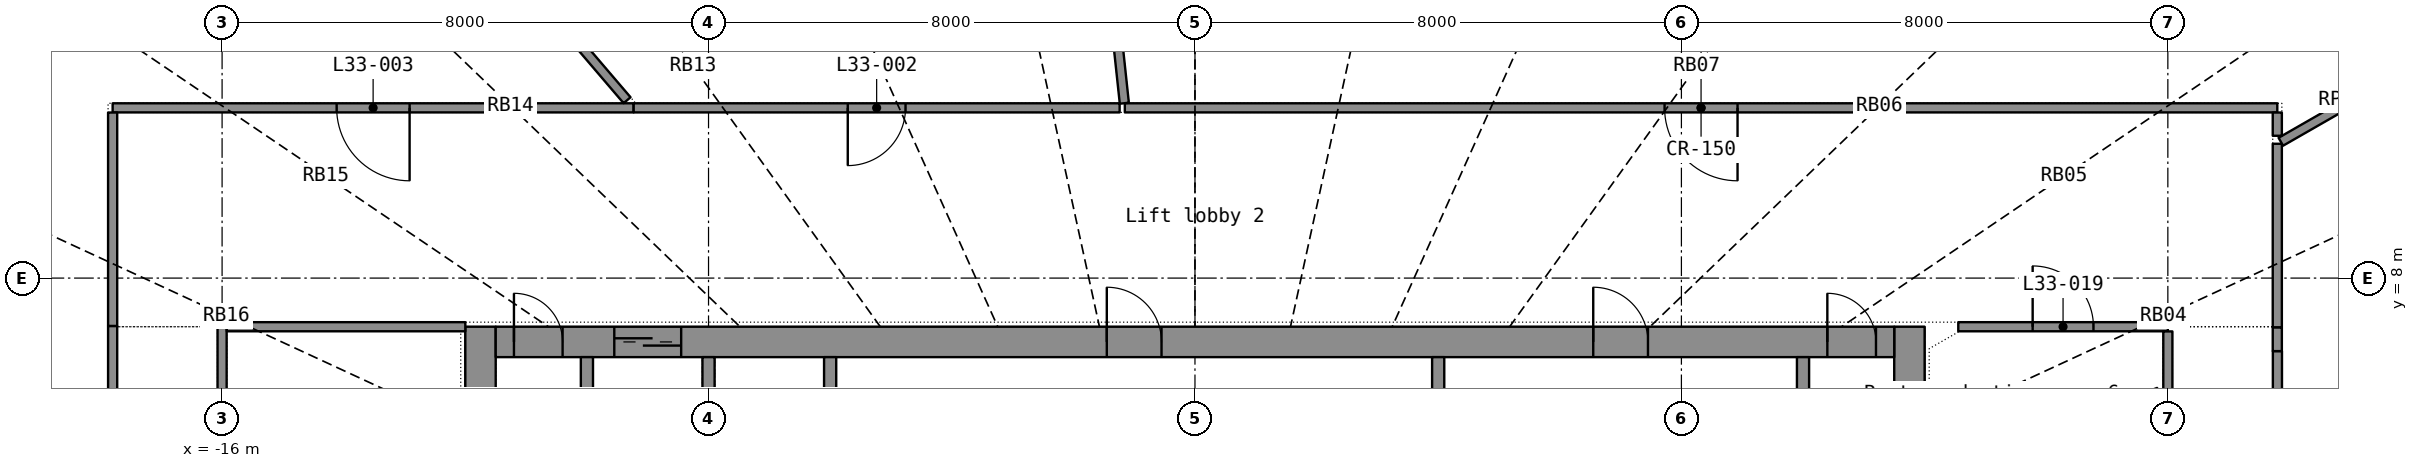
"""IFC4 building model, lengths in metres.
Left out: names, types, materials, properties, quantities, classifications, styles, units other than length and angle.
Written with IfcOpenShell. Run it as: python <this file> out.ifc"""

import sys

from ifc_helpers import new_model, si_unit, direction, frame, frame_2d, origin, place, context, subcontext, project, spatial, rectangle, extrude, element, fill, save


model = new_model("IFC4")
c1 = context("Model", 3, precision=1e-05, world=origin(), true_north=direction((0.0, 1.0)))
c2 = subcontext(c1, "Body", "Model", "MODEL_VIEW")
j1 = project(units=[si_unit("LENGTHUNIT", "METRE"), si_unit("PLANEANGLEUNIT", "RADIAN")], contexts=[c1])
p1 = place(None, origin())
s1 = spatial("IfcSite", under=j1, at=p1, CompositionType="ELEMENT")
p2 = place(p1, origin())
s2 = spatial("IfcBuilding", under=s1, at=p2, CompositionType="ELEMENT")
p3 = place(p2, frame((0.0, 0.0, 137.8)))
s3 = spatial("IfcBuildingStorey", under=s2, at=p3, CompositionType="ELEMENT", Elevation=137.8)
p4 = place(p3, frame((-11.75, -7.2, 0.0), z_axis=(0.0, 0.0, 1.0), x_axis=(0.0, 1.0, 0.0)))
e1 = element("IfcWall", 1, at=p4, inside=s3, PredefinedType="SHEAR", context=c2, shape_type="SweptSolid", body=[
    extrude(rectangle(XDim=14.4, YDim=0.5, at=frame_2d((7.2, 0.0))), origin(), (0.0, 0.0, 1.0), 3.3),
])
p5 = place(p4, frame((6.5, 0.0, 0.0)))
e2 = element("IfcOpeningElement", 2, at=p5, cuts=e1, PredefinedType="OPENING", context=c2, shape_type="SweptSolid", body=[
    extrude(rectangle(XDim=1.4, YDim=2.2, at=frame_2d((0.7, 1.1))), frame((0.0, 0.26, 0.0), z_axis=(0.0, -1.0, 0.0), x_axis=(1.0, 0.0, 0.0)), (0.0, 0.0, 1.0), 0.52),
])
p6 = place(p3, frame((11.75, -7.2, 0.0), z_axis=(0.0, 0.0, 1.0), x_axis=(0.0, 1.0, 0.0)))
e3 = element("IfcWall", 3, at=p6, inside=s3, PredefinedType="SHEAR", context=c2, shape_type="SweptSolid", body=[
    extrude(rectangle(XDim=14.4, YDim=0.5, at=frame_2d((7.2, 0.0))), origin(), (0.0, 0.0, 1.0), 3.3),
])
p7 = place(p6, frame((6.5, 0.0, 0.0)))
e4 = element("IfcOpeningElement", 4, at=p7, cuts=e3, PredefinedType="OPENING", context=c2, shape_type="SweptSolid", body=[
    extrude(rectangle(XDim=1.4, YDim=2.2, at=frame_2d((0.7, 1.1))), frame((0.0, 0.26, 0.0), z_axis=(0.0, -1.0, 0.0), x_axis=(1.0, 0.0, 0.0)), (0.0, 0.0, 1.0), 0.52),
])
p8 = place(p3, frame((-11.5, 6.95, 0.0), z_axis=(0.0, 0.0, 1.0), x_axis=(1.0, 0.0, 0.0)))
e5 = element("IfcWall", 5, at=p8, inside=s3, PredefinedType="SHEAR", context=c2, shape_type="SweptSolid", body=[
    extrude(rectangle(XDim=23.0, YDim=0.5, at=frame_2d((11.5, 0.0))), origin(), (0.0, 0.0, 1.0), 3.3),
])
p9 = place(p8, frame((1.95, 0.0, 0.0)))
e6 = element("IfcOpeningElement", 6, at=p9, cuts=e5, PredefinedType="OPENING", context=c2, shape_type="SweptSolid", body=[
    extrude(rectangle(XDim=1.1, YDim=2.2, at=frame_2d((0.55, 1.1))), frame((0.0, 0.26, 0.0), z_axis=(0.0, -1.0, 0.0), x_axis=(1.0, 0.0, 0.0)), (0.0, 0.0, 1.0), 0.52),
])
p10 = place(p8, frame((10.05, 0.0, 0.0)))
e7 = element("IfcOpeningElement", 7, at=p10, cuts=e5, PredefinedType="OPENING", context=c2, shape_type="SweptSolid", body=[
    extrude(rectangle(XDim=0.9, YDim=2.1, at=frame_2d((0.45, 1.05))), frame((0.0, 0.26, 0.0), z_axis=(0.0, -1.0, 0.0), x_axis=(1.0, 0.0, 0.0)), (0.0, 0.0, 1.0), 0.52),
])
p11 = place(p8, frame((18.05, 0.0, 0.0)))
e8 = element("IfcOpeningElement", 8, at=p11, cuts=e5, PredefinedType="OPENING", context=c2, shape_type="SweptSolid", body=[
    extrude(rectangle(XDim=0.9, YDim=2.1, at=frame_2d((0.45, 1.05))), frame((0.0, 0.26, 0.0), z_axis=(0.0, -1.0, 0.0), x_axis=(1.0, 0.0, 0.0)), (0.0, 0.0, 1.0), 0.52),
])
p12 = place(p8, frame((0.3, 0.0, 0.0)))
e9 = element("IfcOpeningElement", 9, at=p12, cuts=e5, PredefinedType="OPENING", context=c2, shape_type="SweptSolid", body=[
    extrude(rectangle(XDim=0.8, YDim=2.05, at=frame_2d((0.4, 1.025))), frame((0.0, 0.26, 0.0), z_axis=(0.0, -1.0, 0.0), x_axis=(1.0, 0.0, 0.0)), (0.0, 0.0, 1.0), 0.52),
])
p13 = place(p8, frame((21.9, 0.0, 0.0)))
e10 = element("IfcOpeningElement", 10, at=p13, cuts=e5, PredefinedType="OPENING", context=c2, shape_type="SweptSolid", body=[
    extrude(rectangle(XDim=0.8, YDim=2.05, at=frame_2d((0.4, 1.025))), frame((0.0, 0.26, 0.0), z_axis=(0.0, -1.0, 0.0), x_axis=(1.0, 0.0, 0.0)), (0.0, 0.0, 1.0), 0.52),
])
for number, where, z_axis, x_axis in (
    (11, (-10.0, 3.9, 0.0), (0.0, 0.0, 1.0), (0.0, 1.0, 0.0)),
    (12, (-8.0, 3.9, 0.0), (0.0, 0.0, 1.0), (0.0, 1.0, 0.0)),
    (13, (-6.0, 3.9, 0.0), (0.0, 0.0, 1.0), (0.0, 1.0, 0.0)),
    (14, (10.0, 3.9, 0.0), (0.0, 0.0, 1.0), (0.0, 1.0, 0.0)),
):
    element("IfcWall", number, at=place(p3, frame(where, z_axis=z_axis, x_axis=x_axis)), inside=s3, PredefinedType="SHEAR", context=c2, shape_type="SweptSolid", body=[
        extrude(rectangle(XDim=2.8, YDim=0.2, at=frame_2d((1.4, 0.0))), origin(), (0.0, 0.0, 1.0), 3.3),
    ])
p14 = place(p3, frame((4.0, 3.9, 0.0), z_axis=(0.0, 0.0, 1.0), x_axis=(0.0, 1.0, 0.0)))
e15 = element("IfcWall", 15, at=p14, inside=s3, PredefinedType="PARTITIONING", context=c2, shape_type="SweptSolid", body=[
    extrude(rectangle(XDim=2.8, YDim=0.2, at=frame_2d((1.4, 0.0))), origin(), (0.0, 0.0, 1.0), 3.3),
])
p15 = place(p3, frame((17.8, 10.8, 0.0), z_axis=(0.0, 0.0, 1.0), x_axis=(-1.0, 0.0, 0.0)))
e16 = element("IfcWall", 16, at=p15, inside=s3, PredefinedType="PARTITIONING", context=c2, shape_type="SweptSolid", body=[
    extrude(rectangle(XDim=18.954, YDim=0.15, at=frame_2d((9.477, 0.0))), origin(), (0.0, 0.0, 1.0), 2.4),
])
p16 = place(p15, frame((8.877, 0.0, 0.0)))
e17 = element("IfcOpeningElement", 17, at=p16, cuts=e16, PredefinedType="OPENING", context=c2, shape_type="SweptSolid", body=[
    extrude(rectangle(XDim=1.2, YDim=2.2, at=frame_2d((0.6, 1.1))), frame((0.0, 0.085, 0.0), z_axis=(0.0, -1.0, 0.0), x_axis=(1.0, 0.0, 0.0)), (0.0, 0.0, 1.0), 0.17),
])
p17 = place(p3, frame((17.802, -3.905, 0.0), z_axis=(0.0, 0.0, 1.0), x_axis=(0.0, 1.0, 0.0)))
e18 = element("IfcWall", 18, at=p17, inside=s3, PredefinedType="PARTITIONING", context=c2, shape_type="SweptSolid", body=[
    extrude(rectangle(XDim=10.705, YDim=0.15, at=frame_2d((5.353, 0.0))), origin(), (0.0, 0.0, 1.0), 2.4),
])
p18 = place(p17, frame((4.752, 0.0, 0.0)))
e19 = element("IfcOpeningElement", 19, at=p18, cuts=e18, PredefinedType="OPENING", context=c2, shape_type="SweptSolid", body=[
    extrude(rectangle(XDim=1.2, YDim=2.2, at=frame_2d((0.6, 1.1))), frame((0.0, 0.085, 0.0), z_axis=(0.0, -1.0, 0.0), x_axis=(1.0, 0.0, 0.0)), (0.0, 0.0, 1.0), 0.17),
])
p19 = place(p3, frame((-2.152, 20.148, 0.0), z_axis=(0.0, 0.0, 1.0), x_axis=(0.106226181, -0.994341993, 0.0)))
e20 = element("IfcWall", 20, at=p19, inside=s3, PredefinedType="PARTITIONING", context=c2, shape_type="SweptSolid", body=[
    extrude(rectangle(XDim=9.324, YDim=0.15, at=frame_2d((4.662, 0.0))), origin(), (0.0, 0.0, 1.0), 2.4),
])
p20 = place(p3, frame((-9.232, 10.8, 0.0), z_axis=(0.0, 0.0, 1.0), x_axis=(-1.0, 0.0, 0.0)))
e21 = element("IfcWall", 21, at=p20, inside=s3, PredefinedType="PARTITIONING", context=c2, shape_type="SweptSolid", body=[
    extrude(rectangle(XDim=8.568, YDim=0.15, at=frame_2d((4.284, 0.0))), origin(), (0.0, 0.0, 1.0), 2.4),
])
p21 = place(p20, frame((3.684, 0.0, 0.0)))
e22 = element("IfcOpeningElement", 22, at=p21, cuts=e21, PredefinedType="OPENING", context=c2, shape_type="SweptSolid", body=[
    extrude(rectangle(XDim=1.2, YDim=2.2, at=frame_2d((0.6, 1.1))), frame((0.0, 0.085, 0.0), z_axis=(0.0, -1.0, 0.0), x_axis=(1.0, 0.0, 0.0)), (0.0, 0.0, 1.0), 0.17),
])
p22 = place(p3, frame((-17.8, 7.212, 0.0), z_axis=(0.0, 0.0, 1.0), x_axis=(0.0, -1.0, 0.0)))
e23 = element("IfcWall", 23, at=p22, inside=s3, PredefinedType="PARTITIONING", context=c2, shape_type="SweptSolid", body=[
    extrude(rectangle(XDim=8.488, YDim=0.15, at=frame_2d((4.244, 0.0))), origin(), (0.0, 0.0, 1.0), 2.4),
])
p23 = place(p22, frame((3.644, 0.0, 0.0)))
e24 = element("IfcOpeningElement", 24, at=p23, cuts=e23, PredefinedType="OPENING", context=c2, shape_type="SweptSolid", body=[
    extrude(rectangle(XDim=1.2, YDim=2.2, at=frame_2d((0.6, 1.1))), frame((0.0, 0.085, 0.0), z_axis=(0.0, -1.0, 0.0), x_axis=(1.0, 0.0, 0.0)), (0.0, 0.0, 1.0), 0.17),
])
p24 = place(p3, frame((-1.239, 10.8, 0.0), z_axis=(0.0, 0.0, 1.0), x_axis=(-1.0, 0.0, 0.0)))
e25 = element("IfcWall", 25, at=p24, inside=s3, PredefinedType="PARTITIONING", context=c2, shape_type="SweptSolid", body=[
    extrude(rectangle(XDim=7.992, YDim=0.15, at=frame_2d((3.996, 0.0))), origin(), (0.0, 0.0, 1.0), 2.4),
])
p25 = place(p24, frame((3.521, 0.0, 0.0)))
e26 = element("IfcOpeningElement", 26, at=p25, cuts=e25, PredefinedType="OPENING", context=c2, shape_type="SweptSolid", body=[
    extrude(rectangle(XDim=0.95, YDim=2.15, at=frame_2d((0.475, 1.075))), frame((0.0, 0.085, 0.0), z_axis=(0.0, -1.0, 0.0), x_axis=(1.0, 0.0, 0.0)), (0.0, 0.0, 1.0), 0.17),
])
p26 = place(p3, frame((-14.167, 16.573, 0.0), z_axis=(0.0, 0.0, 1.0), x_axis=(0.64976247, -0.760137312, 0.0)))
e27 = element("IfcWall", 27, at=p26, inside=s3, PredefinedType="PARTITIONING", context=c2, shape_type="SweptSolid", body=[
    extrude(rectangle(XDim=7.43, YDim=0.15, at=frame_2d((3.715, 0.0))), origin(), (0.0, 0.0, 1.0), 2.4),
])
p27 = place(p3, frame((-16.0, 0.9, 0.0), z_axis=(0.0, 0.0, 1.0), x_axis=(0.0, 1.0, 0.0)))
e28 = element("IfcWall", 28, at=p27, inside=s3, PredefinedType="PARTITIONING", context=c2, shape_type="SweptSolid", body=[
    extrude(rectangle(XDim=6.3, YDim=0.15, at=frame_2d((3.15, 0.0))), origin(), (0.0, 0.0, 1.0), 2.4),
])
p28 = place(p27, frame((2.55, 0.0, 0.0)))
e29 = element("IfcOpeningElement", 29, at=p28, cuts=e28, PredefinedType="OPENING", context=c2, shape_type="SweptSolid", body=[
    extrude(rectangle(XDim=1.2, YDim=2.2, at=frame_2d((0.6, 1.1))), frame((0.0, 0.085, 0.0), z_axis=(0.0, -1.0, 0.0), x_axis=(1.0, 0.0, 0.0)), (0.0, 0.0, 1.0), 0.17),
])
p29 = place(p3, frame((-15.923, 7.2, 0.0), z_axis=(0.0, 0.0, 1.0), x_axis=(1.0, 0.0, 0.0)))
e30 = element("IfcWall", 30, at=p29, inside=s3, PredefinedType="PARTITIONING", context=c2, shape_type="SweptSolid", body=[
    extrude(rectangle(XDim=3.923, YDim=0.15, at=frame_2d((1.961, 0.0))), origin(), (0.0, 0.0, 1.0), 2.4),
])
p30 = place(p3, frame((-17.8, 10.723, 0.0), z_axis=(0.0, 0.0, 1.0), x_axis=(0.0, -1.0, 0.0)))
e31 = element("IfcWall", 31, at=p30, inside=s3, PredefinedType="PARTITIONING", context=c2, shape_type="SweptSolid", body=[
    extrude(rectangle(XDim=3.51, YDim=0.15, at=frame_2d((1.755, 0.0))), origin(), (0.0, 0.0, 1.0), 2.4),
])
p31 = place(p3, frame((12.553, 7.2, 0.0), z_axis=(0.0, 0.0, 1.0), x_axis=(1.0, 0.0, 0.0)))
e32 = element("IfcWall", 32, at=p31, inside=s3, PredefinedType="PARTITIONING", context=c2, shape_type="SweptSolid", body=[
    extrude(rectangle(XDim=3.447, YDim=0.15, at=frame_2d((1.723, 0.0))), origin(), (0.0, 0.0, 1.0), 2.4),
])
p32 = place(p31, frame((1.223, 0.0, 0.0)))
e33 = element("IfcOpeningElement", 33, at=p32, cuts=e32, PredefinedType="OPENING", context=c2, shape_type="SweptSolid", body=[
    extrude(rectangle(XDim=1.0, YDim=2.2, at=frame_2d((0.5, 1.1))), frame((0.0, 0.085, 0.0), z_axis=(0.0, -1.0, 0.0), x_axis=(1.0, 0.0, 0.0)), (0.0, 0.0, 1.0), 0.17),
])
p33 = place(p3, frame((17.8, 7.188, 0.0), z_axis=(0.0, 0.0, 1.0), x_axis=(0.0, 1.0, 0.0)))
e34 = element("IfcWall", 34, at=p33, inside=s3, PredefinedType="PARTITIONING", context=c2, shape_type="SweptSolid", body=[
    extrude(rectangle(XDim=3.021, YDim=0.15, at=frame_2d((1.511, 0.0))), origin(), (0.0, 0.0, 1.0), 2.4),
])
p34 = place(p3, frame((17.858, 10.243, 0.0), z_axis=(0.0, 0.0, 1.0), x_axis=(0.867454205, 0.497517037, 0.0)))
e35 = element("IfcWall", 35, at=p34, inside=s3, PredefinedType="PARTITIONING", context=c2, shape_type="SweptSolid", body=[
    extrude(rectangle(XDim=2.746, YDim=0.15, at=frame_2d((1.373, 0.0))), origin(), (0.0, 0.0, 1.0), 2.4),
])
p35 = place(p3, frame((16.0, 7.123, 0.0), z_axis=(0.0, 0.0, 1.0), x_axis=(0.0, -1.0, 0.0)))
e36 = element("IfcWall", 36, at=p35, inside=s3, PredefinedType="PARTITIONING", context=c2, shape_type="SweptSolid", body=[
    extrude(rectangle(XDim=1.011, YDim=0.15, at=frame_2d((0.505, 0.0))), origin(), (0.0, 0.0, 1.0), 2.4),
])
p36 = place(p3, frame((17.8, 10.341, 0.0), z_axis=(0.0, 0.0, 1.0), x_axis=(0.0, 1.0, 0.0)))
e37 = element("IfcWall", 37, at=p36, inside=s3, PredefinedType="PARTITIONING", context=c2, shape_type="SweptSolid", body=[
    extrude(rectangle(XDim=0.382, YDim=0.15, at=frame_2d((0.191, 0.0))), origin(), (0.0, 0.0, 1.0), 2.4),
])
p37 = place(p3, frame((17.8, 6.799, 0.0), z_axis=(0.0, 0.0, 1.0), x_axis=(0.0, 1.0, 0.0)))
e38 = element("IfcWall", 38, at=p37, inside=s3, PredefinedType="PARTITIONING", context=c2, shape_type="SweptSolid", body=[
    extrude(rectangle(XDim=0.388, YDim=0.15, at=frame_2d((0.194, 0.0))), origin(), (0.0, 0.0, 1.0), 2.4),
])
p38 = place(p9, origin())
e39 = element("IfcDoor", 39, at=p38, inside=s3, OperationType="DOUBLE_DOOR_SLIDING", PredefinedType="DOOR", context=c2, shape_type="SweptSolid", body=[
    extrude(rectangle(XDim=1.1, YDim=2.2, at=frame_2d((0.55, 1.1))), frame((0.0, 0.025, 0.0), z_axis=(0.0, -1.0, 0.0), x_axis=(1.0, 0.0, 0.0)), (0.0, 0.0, 1.0), 0.05),
])
fill(e6, e39)
p39 = place(p10, origin())
e40 = element("IfcDoor", 40, at=p39, inside=s3, OperationType="SINGLE_SWING_LEFT", PredefinedType="DOOR", context=c2, shape_type="SweptSolid", body=[
    extrude(rectangle(XDim=0.9, YDim=2.1, at=frame_2d((0.45, 1.05))), frame((0.0, 0.025, 0.0), z_axis=(0.0, -1.0, 0.0), x_axis=(1.0, 0.0, 0.0)), (0.0, 0.0, 1.0), 0.05),
])
fill(e7, e40)
p40 = place(p11, origin())
e41 = element("IfcDoor", 41, at=p40, inside=s3, OperationType="SINGLE_SWING_LEFT", PredefinedType="DOOR", context=c2, shape_type="SweptSolid", body=[
    extrude(rectangle(XDim=0.9, YDim=2.1, at=frame_2d((0.45, 1.05))), frame((0.0, 0.025, 0.0), z_axis=(0.0, -1.0, 0.0), x_axis=(1.0, 0.0, 0.0)), (0.0, 0.0, 1.0), 0.05),
])
fill(e8, e41)
p41 = place(p12, origin())
e42 = element("IfcDoor", 42, at=p41, inside=s3, OperationType="SINGLE_SWING_LEFT", PredefinedType="DOOR", context=c2, shape_type="SweptSolid", body=[
    extrude(rectangle(XDim=0.8, YDim=2.05, at=frame_2d((0.4, 1.025))), frame((0.0, 0.025, 0.0), z_axis=(0.0, -1.0, 0.0), x_axis=(1.0, 0.0, 0.0)), (0.0, 0.0, 1.0), 0.05),
])
fill(e9, e42)
p42 = place(p13, origin())
e43 = element("IfcDoor", 43, at=p42, inside=s3, OperationType="SINGLE_SWING_LEFT", PredefinedType="DOOR", context=c2, shape_type="SweptSolid", body=[
    extrude(rectangle(XDim=0.8, YDim=2.05, at=frame_2d((0.4, 1.025))), frame((0.0, 0.025, 0.0), z_axis=(0.0, -1.0, 0.0), x_axis=(1.0, 0.0, 0.0)), (0.0, 0.0, 1.0), 0.05),
])
fill(e10, e43)
p43 = place(p16, origin())
e44 = element("IfcDoor", 44, at=p43, inside=s3, OperationType="DOUBLE_DOOR_SINGLE_SWING", PredefinedType="DOOR", context=c2, shape_type="SweptSolid", body=[
    extrude(rectangle(XDim=1.2, YDim=2.2, at=frame_2d((0.6, 1.1))), frame((0.0, 0.025, 0.0), z_axis=(0.0, -1.0, 0.0), x_axis=(1.0, 0.0, 0.0)), (0.0, 0.0, 1.0), 0.05),
])
fill(e17, e44)
p44 = place(p25, origin())
e45 = element("IfcDoor", 45, at=p44, inside=s3, OperationType="SINGLE_SWING_RIGHT", PredefinedType="DOOR", context=c2, shape_type="SweptSolid", body=[
    extrude(rectangle(XDim=0.95, YDim=2.15, at=frame_2d((0.475, 1.075))), frame((0.0, 0.025, 0.0), z_axis=(0.0, -1.0, 0.0), x_axis=(1.0, 0.0, 0.0)), (0.0, 0.0, 1.0), 0.05),
])
fill(e26, e45)
p45 = place(p21, origin())
e46 = element("IfcDoor", 46, at=p45, inside=s3, OperationType="DOUBLE_DOOR_SINGLE_SWING", PredefinedType="DOOR", context=c2, shape_type="SweptSolid", body=[
    extrude(rectangle(XDim=1.2, YDim=2.2, at=frame_2d((0.6, 1.1))), frame((0.0, 0.025, 0.0), z_axis=(0.0, -1.0, 0.0), x_axis=(1.0, 0.0, 0.0)), (0.0, 0.0, 1.0), 0.05),
])
fill(e22, e46)
p46 = place(p32, origin())
e47 = element("IfcDoor", 47, at=p46, inside=s3, OperationType="SINGLE_SWING_LEFT", PredefinedType="DOOR", context=c2, shape_type="SweptSolid", body=[
    extrude(rectangle(XDim=1.0, YDim=2.2, at=frame_2d((0.5, 1.1))), frame((0.0, 0.025, 0.0), z_axis=(0.0, -1.0, 0.0), x_axis=(1.0, 0.0, 0.0)), (0.0, 0.0, 1.0), 0.05),
])
fill(e33, e47)
save(model, sys.argv[1])
